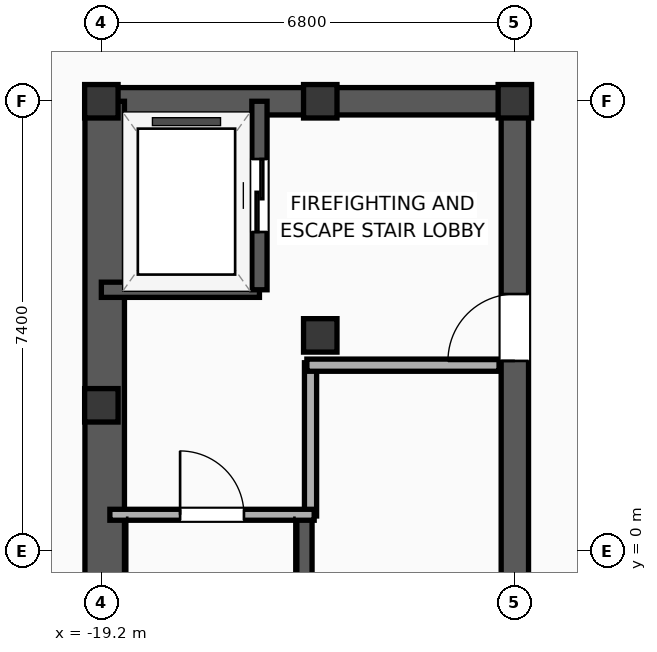
"""IFC4 building model, lengths in metres.
Left out: names, types, materials, properties, quantities, classifications, styles, units other than length and angle.
Written with IfcOpenShell. Run it as: python <this file> out.ifc"""

import sys

from ifc_helpers import new_model, si_unit, direction, frame, frame_2d, origin, origin_2d, place, context, subcontext, project, spatial, rectangle, hollow_rectangle, extrude, element, fill, save


model = new_model("IFC4")
c1 = context("Model", 3, precision=1e-05, world=origin(), true_north=direction((0.0, 1.0)))
c2 = subcontext(c1, "Body", "Model", "MODEL_VIEW")
j1 = project(units=[si_unit("LENGTHUNIT", "METRE"), si_unit("PLANEANGLEUNIT", "RADIAN")], contexts=[c1])
p1 = place(None, origin())
s1 = spatial("IfcSite", under=j1, at=p1, CompositionType="ELEMENT")
p2 = place(p1, origin())
s2 = spatial("IfcBuilding", under=s1, at=p2, CompositionType="ELEMENT")
p3 = place(p2, frame((0.0, 0.0, 326.6)))
s3 = spatial("IfcBuildingStorey", under=s2, at=p3, CompositionType="ELEMENT", Elevation=326.6)
for number, where, z_axis, x_axis in (
    (1, (-19.2, 2.4, 0.0), (0.0, 0.0, 1.0), (1.0, 0.0, 0.0)),
    (2, (-19.2, 7.4, 0.0), (0.0, 0.0, 1.0), (1.0, 0.0, 0.0)),
    (3, (-15.6, 7.4, 0.0), (0.0, 0.0, 1.0), (1.0, 0.0, 0.0)),
    (4, (-15.6, 3.55, 0.0), (0.0, 0.0, 1.0), (1.0, 0.0, 0.0)),
    (5, (-12.4, 7.4, 0.0), (0.0, 0.0, 1.0), (1.0, 0.0, 0.0)),
):
    element("IfcColumn", number, at=place(p3, frame(where, z_axis=z_axis, x_axis=x_axis)), inside=s3, PredefinedType="COLUMN", context=c2, shape_type="SweptSolid", body=[
        extrude(hollow_rectangle(XDim=0.55, YDim=0.55, WallThickness=0.022, at=origin_2d()), origin(), (0.0, 0.0, 1.0), 5.3),
    ])
p4 = place(p3, frame((-19.425, 7.4, 0.0), z_axis=(0.0, 0.0, 1.0), x_axis=(1.0, 0.0, 0.0)))
e6 = element("IfcWall", 6, at=p4, inside=s3, PredefinedType="SHEAR", context=c2, shape_type="SweptSolid", body=[
    extrude(rectangle(XDim=7.25, YDim=0.45, at=frame_2d((3.625, 0.0))), origin(), (0.0, 0.0, 1.0), 5.025),
])
p5 = place(p3, frame((-19.145, -7.4, 0.0), z_axis=(0.0, 0.0, 1.0), x_axis=(0.0, 1.0, 0.0)))
e7 = element("IfcWall", 7, at=p5, inside=s3, PredefinedType="SHEAR", context=c2, shape_type="SweptSolid", body=[
    extrude(rectangle(XDim=14.8, YDim=0.65, at=frame_2d((7.4, 0.0))), origin(), (0.0, 0.0, 1.0), 5.025),
])
p6 = place(p3, frame((-12.4, -7.4, 0.0), z_axis=(0.0, 0.0, 1.0), x_axis=(0.0, 1.0, 0.0)))
e8 = element("IfcWall", 8, at=p6, inside=s3, PredefinedType="SHEAR", context=c2, shape_type="SweptSolid", body=[
    extrude(rectangle(XDim=14.8, YDim=0.45, at=frame_2d((7.4, 0.0))), origin(), (0.0, 0.0, 1.0), 5.025),
])
p7 = place(p6, frame((10.53, 0.0, 0.0)))
e9 = element("IfcOpeningElement", 9, at=p7, cuts=e8, PredefinedType="OPENING", context=c2, shape_type="SweptSolid", body=[
    extrude(rectangle(XDim=1.1, YDim=2.05, at=frame_2d((0.55, 1.025))), frame((0.0, 0.235, 0.0), z_axis=(0.0, -1.0, 0.0), x_axis=(1.0, 0.0, 0.0)), (0.0, 0.0, 1.0), 0.47),
])
p8 = place(p6, frame((4.45, 0.0, 0.0)))
e10 = element("IfcOpeningElement", 10, at=p8, cuts=e8, PredefinedType="OPENING", context=c2, shape_type="SweptSolid", body=[
    extrude(rectangle(XDim=0.9, YDim=2.05, at=frame_2d((0.45, 1.025))), frame((0.0, 0.235, 0.0), z_axis=(0.0, -1.0, 0.0), x_axis=(1.0, 0.0, 0.0)), (0.0, 0.0, 1.0), 0.47),
])
p9 = place(p3, frame((-15.86, -7.085, 0.0), z_axis=(0.0, 0.0, 1.0), x_axis=(0.0, 1.0, 0.0)))
e11 = element("IfcWall", 11, at=p9, inside=s3, PredefinedType="SOLIDWALL", context=c2, shape_type="SweptSolid", body=[
    extrude(rectangle(XDim=7.685, YDim=0.25, at=frame_2d((3.843, 0.0))), origin(), (0.0, 0.0, 1.0), 5.025),
])
p10 = place(p3, frame((-19.2, 4.3, 0.0), z_axis=(0.0, 0.0, 1.0), x_axis=(1.0, 0.0, 0.0)))
e12 = element("IfcWall", 12, at=p10, inside=s3, PredefinedType="SOLIDWALL", context=c2, shape_type="SweptSolid", body=[
    extrude(rectangle(XDim=2.6, YDim=0.25, at=frame_2d((1.3, 0.0))), origin(), (0.0, 0.0, 1.0), 5.025),
])
p11 = place(p3, frame((-16.6, 4.3, 0.0), z_axis=(0.0, 0.0, 1.0), x_axis=(0.0, 1.0, 0.0)))
e13 = element("IfcWall", 13, at=p11, inside=s3, PredefinedType="SOLIDWALL", context=c2, shape_type="SweptSolid", body=[
    extrude(rectangle(XDim=3.1, YDim=0.25, at=frame_2d((1.55, 0.0))), origin(), (0.0, 0.0, 1.0), 5.025),
])
p12 = place(p11, frame((0.95, 0.0, 0.0)))
e14 = element("IfcOpeningElement", 14, at=p12, cuts=e13, PredefinedType="OPENING", context=c2, shape_type="SweptSolid", body=[
    extrude(rectangle(XDim=1.2, YDim=2.05, at=frame_2d((0.6, 1.025))), frame((0.0, 0.135, 0.0), z_axis=(0.0, -1.0, 0.0), x_axis=(1.0, 0.0, 0.0)), (0.0, 0.0, 1.0), 0.27),
])
p13 = place(p3, frame((-15.76, 0.58, 0.0), z_axis=(0.0, 0.0, 1.0), x_axis=(0.0, 1.0, 0.0)))
e15 = element("IfcWall", 15, at=p13, inside=s3, PredefinedType="PARTITIONING", context=c2, shape_type="SweptSolid", body=[
    extrude(rectangle(XDim=2.52, YDim=0.2, at=frame_2d((1.26, 0.0))), origin(), (0.0, 0.0, 1.0), 5.025),
])
p14 = place(p3, frame((-15.82, 3.06, 0.0), z_axis=(0.0, 0.0, 1.0), x_axis=(1.0, 0.0, 0.0)))
e16 = element("IfcWall", 16, at=p14, inside=s3, PredefinedType="PARTITIONING", context=c2, shape_type="SweptSolid", body=[
    extrude(rectangle(XDim=3.16, YDim=0.2, at=frame_2d((1.58, 0.0))), origin(), (0.0, 0.0, 1.0), 5.025),
])
p15 = place(p3, frame((-19.06, 0.6, 0.0), z_axis=(0.0, 0.0, 1.0), x_axis=(1.0, 0.0, 0.0)))
e17 = element("IfcWall", 17, at=p15, inside=s3, PredefinedType="PARTITIONING", context=c2, shape_type="SweptSolid", body=[
    extrude(rectangle(XDim=3.36, YDim=0.18, at=frame_2d((1.68, 0.0))), origin(), (0.0, 0.0, 1.0), 5.025),
])
p16 = place(p15, frame((1.155, 0.0, 0.0)))
e18 = element("IfcOpeningElement", 18, at=p16, cuts=e17, PredefinedType="OPENING", context=c2, shape_type="SweptSolid", body=[
    extrude(rectangle(XDim=1.05, YDim=2.05, at=frame_2d((0.525, 1.025))), frame((0.0, 0.1, 0.0), z_axis=(0.0, -1.0, 0.0), x_axis=(1.0, 0.0, 0.0)), (0.0, 0.0, 1.0), 0.2),
])
p17 = place(p12, origin())
e19 = element("IfcDoor", 19, at=p17, inside=s3, OperationType="SLIDING_TO_LEFT", PredefinedType="DOOR", context=c2, shape_type="SweptSolid", body=[
    extrude(rectangle(XDim=1.2, YDim=2.05, at=frame_2d((0.6, 1.025))), frame((0.0, 0.025, 0.0), z_axis=(0.0, -1.0, 0.0), x_axis=(1.0, 0.0, 0.0)), (0.0, 0.0, 1.0), 0.05),
])
fill(e14, e19)
p18 = place(p16, origin())
e20 = element("IfcDoor", 20, at=p18, inside=s3, OperationType="SINGLE_SWING_LEFT", PredefinedType="DOOR", context=c2, shape_type="SweptSolid", body=[
    extrude(rectangle(XDim=1.05, YDim=2.05, at=frame_2d((0.525, 1.025))), frame((0.0, 0.025, 0.0), z_axis=(0.0, -1.0, 0.0), x_axis=(1.0, 0.0, 0.0)), (0.0, 0.0, 1.0), 0.05),
])
fill(e18, e20)
p19 = place(p7, origin())
e21 = element("IfcDoor", 21, at=p19, inside=s3, OperationType="SINGLE_SWING_LEFT", PredefinedType="DOOR", context=c2, shape_type="SweptSolid", body=[
    extrude(rectangle(XDim=1.1, YDim=2.05, at=frame_2d((0.55, 1.025))), frame((0.0, 0.025, 0.0), z_axis=(0.0, -1.0, 0.0), x_axis=(1.0, 0.0, 0.0)), (0.0, 0.0, 1.0), 0.05),
])
fill(e9, e21)
save(model, sys.argv[1])
